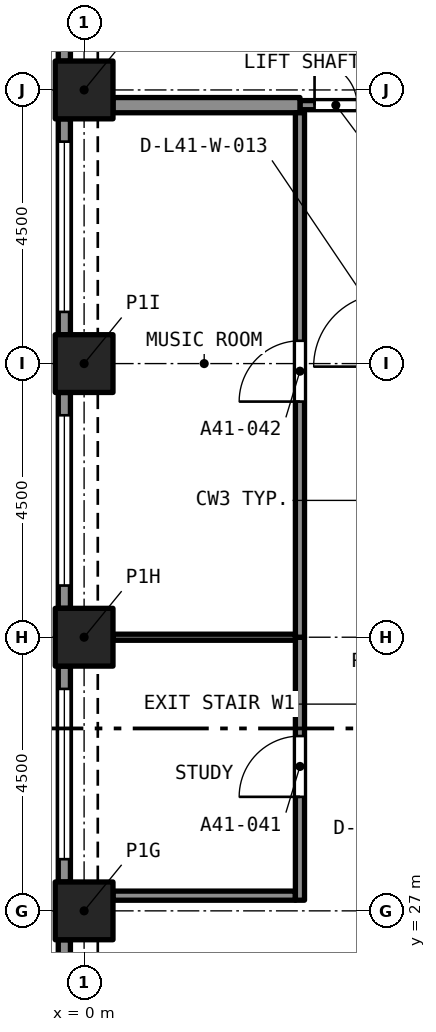
"""IFC4 building model, lengths in metres.
Left out: names, types, materials, properties, quantities, classifications, styles, units other than length and angle.
Written with IfcOpenShell. Run it as: python <this file> out.ifc"""

import sys

from ifc_helpers import new_model, si_unit, direction, frame, frame_2d, origin, origin_2d, place, context, subcontext, project, spatial, rectangle, extrude, element, fill, save


model = new_model("IFC4")
c1 = context("Model", 3, precision=1e-05, world=origin(), true_north=direction((0.0, 1.0)))
c2 = subcontext(c1, "Body", "Model", "MODEL_VIEW")
j1 = project(units=[si_unit("LENGTHUNIT", "METRE"), si_unit("PLANEANGLEUNIT", "RADIAN")], contexts=[c1])
p1 = place(None, origin())
s1 = spatial("IfcSite", under=j1, at=p1, CompositionType="ELEMENT")
p2 = place(p1, origin())
s2 = spatial("IfcBuilding", under=s1, at=p2, CompositionType="ELEMENT")
p3 = place(p2, frame((0.0, 0.0, 146.2)))
s3 = spatial("IfcBuildingStorey", under=s2, at=p3, CompositionType="ELEMENT", Elevation=146.2)
for number, where, z_axis, x_axis in (
    (1, (0.0, 27.0, 0.0), (0.0, 0.0, 1.0), (1.0, 0.0, 0.0)),
    (2, (0.0, 31.5, 0.0), (0.0, 0.0, 1.0), (1.0, 0.0, 0.0)),
    (3, (0.0, 36.0, 0.0), (0.0, 0.0, 1.0), (1.0, 0.0, 0.0)),
    (4, (0.0, 40.5, 0.0), (0.0, 0.0, 1.0), (1.0, 0.0, 0.0)),
):
    element("IfcColumn", number, at=place(p3, frame(where, z_axis=z_axis, x_axis=x_axis)), inside=s3, PredefinedType="COLUMN", context=c2, shape_type="SweptSolid", body=[
        extrude(rectangle(XDim=0.95, YDim=0.95, at=origin_2d()), origin(), (0.0, 0.0, 1.0), 4.4),
    ])
p4 = place(p3, frame((-0.325, 40.975, 0.0), z_axis=(0.0, 0.0, 1.0), x_axis=(0.0, 1.0, 0.0)))
e5 = element("IfcWall", 5, at=p4, inside=s3, PredefinedType="SOLIDWALL", context=c2, shape_type="SweptSolid", body=[
    extrude(rectangle(XDim=3.55, YDim=0.2, at=frame_2d((1.775, 0.0))), origin(), (0.0, 0.0, 1.0), 4.4),
])
p5 = place(p4, frame((0.375, 0.0, 0.45)))
e6 = element("IfcOpeningElement", 6, at=p5, cuts=e5, PredefinedType="OPENING", context=c2, shape_type="SweptSolid", body=[
    extrude(rectangle(XDim=2.8, YDim=2.55, at=frame_2d((1.4, 1.275))), frame((0.0, 0.11, 0.0), z_axis=(0.0, -1.0, 0.0), x_axis=(1.0, 0.0, 0.0)), (0.0, 0.0, 1.0), 0.22),
])
p6 = place(p3, frame((-0.325, 36.475, 0.0), z_axis=(0.0, 0.0, 1.0), x_axis=(0.0, 1.0, 0.0)))
e7 = element("IfcWall", 7, at=p6, inside=s3, PredefinedType="SOLIDWALL", context=c2, shape_type="SweptSolid", body=[
    extrude(rectangle(XDim=3.55, YDim=0.2, at=frame_2d((1.775, 0.0))), origin(), (0.0, 0.0, 1.0), 4.4),
])
p7 = place(p6, frame((0.375, 0.0, 0.45)))
e8 = element("IfcOpeningElement", 8, at=p7, cuts=e7, PredefinedType="OPENING", context=c2, shape_type="SweptSolid", body=[
    extrude(rectangle(XDim=2.8, YDim=2.55, at=frame_2d((1.4, 1.275))), frame((0.0, 0.11, 0.0), z_axis=(0.0, -1.0, 0.0), x_axis=(1.0, 0.0, 0.0)), (0.0, 0.0, 1.0), 0.22),
])
p8 = place(p3, frame((-0.325, 31.975, 0.0), z_axis=(0.0, 0.0, 1.0), x_axis=(0.0, 1.0, 0.0)))
e9 = element("IfcWall", 9, at=p8, inside=s3, PredefinedType="SOLIDWALL", context=c2, shape_type="SweptSolid", body=[
    extrude(rectangle(XDim=3.55, YDim=0.2, at=frame_2d((1.775, 0.0))), origin(), (0.0, 0.0, 1.0), 4.4),
])
p9 = place(p8, frame((0.375, 0.0, 0.45)))
e10 = element("IfcOpeningElement", 10, at=p9, cuts=e9, PredefinedType="OPENING", context=c2, shape_type="SweptSolid", body=[
    extrude(rectangle(XDim=2.8, YDim=2.55, at=frame_2d((1.4, 1.275))), frame((0.0, 0.11, 0.0), z_axis=(0.0, -1.0, 0.0), x_axis=(1.0, 0.0, 0.0)), (0.0, 0.0, 1.0), 0.22),
])
p10 = place(p3, frame((-0.325, 27.475, 0.0), z_axis=(0.0, 0.0, 1.0), x_axis=(0.0, 1.0, 0.0)))
e11 = element("IfcWall", 11, at=p10, inside=s3, PredefinedType="SOLIDWALL", context=c2, shape_type="SweptSolid", body=[
    extrude(rectangle(XDim=3.55, YDim=0.2, at=frame_2d((1.775, 0.0))), origin(), (0.0, 0.0, 1.0), 4.4),
])
p11 = place(p10, frame((0.375, 0.0, 0.45)))
e12 = element("IfcOpeningElement", 12, at=p11, cuts=e11, PredefinedType="OPENING", context=c2, shape_type="SweptSolid", body=[
    extrude(rectangle(XDim=2.8, YDim=2.55, at=frame_2d((1.4, 1.275))), frame((0.0, 0.11, 0.0), z_axis=(0.0, -1.0, 0.0), x_axis=(1.0, 0.0, 0.0)), (0.0, 0.0, 1.0), 0.22),
])
p12 = place(p3, frame((-0.325, 22.975, 0.0), z_axis=(0.0, 0.0, 1.0), x_axis=(0.0, 1.0, 0.0)))
e13 = element("IfcWall", 13, at=p12, inside=s3, PredefinedType="SOLIDWALL", context=c2, shape_type="SweptSolid", body=[
    extrude(rectangle(XDim=3.55, YDim=0.2, at=frame_2d((1.775, 0.0))), origin(), (0.0, 0.0, 1.0), 4.4),
])
p13 = place(p12, frame((0.375, 0.0, 0.45)))
e14 = element("IfcOpeningElement", 14, at=p13, cuts=e13, PredefinedType="OPENING", context=c2, shape_type="SweptSolid", body=[
    extrude(rectangle(XDim=2.8, YDim=2.55, at=frame_2d((1.4, 1.275))), frame((0.0, 0.11, 0.0), z_axis=(0.0, -1.0, 0.0), x_axis=(1.0, 0.0, 0.0)), (0.0, 0.0, 1.0), 0.22),
])
p14 = place(p3, frame((3.55, 40.25, 0.0), z_axis=(0.0, 0.0, 1.0), x_axis=(1.0, 0.0, 0.0)))
e15 = element("IfcWall", 15, at=p14, inside=s3, PredefinedType="PARTITIONING", context=c2, shape_type="SweptSolid", body=[
    extrude(rectangle(XDim=1.2, YDim=0.15, at=frame_2d((0.6, 0.0))), origin(), (0.0, 0.0, 1.0), 4.1),
])
p15 = place(p14, frame((0.24, 0.0, 0.0)))
e16 = element("IfcOpeningElement", 16, at=p15, cuts=e15, PredefinedType="OPENING", context=c2, shape_type="SweptSolid", body=[
    extrude(rectangle(XDim=0.7, YDim=2.1, at=frame_2d((0.35, 1.05))), frame((0.0, 0.085, 0.0), z_axis=(0.0, -1.0, 0.0), x_axis=(1.0, 0.0, 0.0)), (0.0, 0.0, 1.0), 0.17),
])
p16 = place(p3, frame((0.475, 40.25, 0.0), z_axis=(0.0, 0.0, 1.0), x_axis=(1.0, 0.0, 0.0)))
e17 = element("IfcWall", 17, at=p16, inside=s3, PredefinedType="PARTITIONING", context=c2, shape_type="SweptSolid", body=[
    extrude(rectangle(XDim=3.075, YDim=0.25, at=frame_2d((1.538, 0.0))), origin(), (0.0, 0.0, 1.0), 4.1),
])
p17 = place(p3, frame((0.475, 27.25, 0.0), z_axis=(0.0, 0.0, 1.0), x_axis=(1.0, 0.0, 0.0)))
e18 = element("IfcWall", 18, at=p17, inside=s3, PredefinedType="PARTITIONING", context=c2, shape_type="SweptSolid", body=[
    extrude(rectangle(XDim=3.0, YDim=0.15, at=frame_2d((1.5, 0.0))), origin(), (0.0, 0.0, 1.0), 4.1),
])
p18 = place(p3, frame((3.55, 27.175, 0.0), z_axis=(0.0, 0.0, 1.0), x_axis=(0.0, 1.0, 0.0)))
e19 = element("IfcWall", 19, at=p18, inside=s3, PredefinedType="PARTITIONING", context=c2, shape_type="SweptSolid", body=[
    extrude(rectangle(XDim=4.325, YDim=0.15, at=frame_2d((2.163, 0.0))), origin(), (0.0, 0.0, 1.0), 4.1),
])
p19 = place(p18, frame((1.7, 0.0, 0.0)))
e20 = element("IfcOpeningElement", 20, at=p19, cuts=e19, PredefinedType="OPENING", context=c2, shape_type="SweptSolid", body=[
    extrude(rectangle(XDim=1.0, YDim=2.1, at=frame_2d((0.5, 1.05))), frame((0.0, 0.085, 0.0), z_axis=(0.0, -1.0, 0.0), x_axis=(1.0, 0.0, 0.0)), (0.0, 0.0, 1.0), 0.17),
])
p20 = place(p3, frame((3.55, 31.5, 0.0), z_axis=(0.0, 0.0, 1.0), x_axis=(0.0, 1.0, 0.0)))
e21 = element("IfcWall", 21, at=p20, inside=s3, PredefinedType="PARTITIONING", context=c2, shape_type="SweptSolid", body=[
    extrude(rectangle(XDim=8.625, YDim=0.15, at=frame_2d((4.312, 0.0))), origin(), (0.0, 0.0, 1.0), 4.1),
])
p21 = place(p20, frame((3.875, 0.0, 0.0)))
e22 = element("IfcOpeningElement", 22, at=p21, cuts=e21, PredefinedType="OPENING", context=c2, shape_type="SweptSolid", body=[
    extrude(rectangle(XDim=1.0, YDim=2.1, at=frame_2d((0.5, 1.05))), frame((0.0, 0.085, 0.0), z_axis=(0.0, -1.0, 0.0), x_axis=(1.0, 0.0, 0.0)), (0.0, 0.0, 1.0), 0.17),
])
p22 = place(p3, frame((0.475, 31.5, 0.0), z_axis=(0.0, 0.0, 1.0), x_axis=(1.0, 0.0, 0.0)))
e23 = element("IfcWall", 23, at=p22, inside=s3, PredefinedType="PARTITIONING", context=c2, shape_type="SweptSolid", body=[
    extrude(rectangle(XDim=3.0, YDim=0.1, at=frame_2d((1.5, 0.0))), origin(), (0.0, 0.0, 1.0), 4.1),
])
p23 = place(p7, origin())
e24 = element("IfcWindow", 24, at=p23, inside=s3, PartitioningType="SINGLE_PANEL", PredefinedType="WINDOW", context=c2, shape_type="SweptSolid", body=[
    extrude(rectangle(XDim=2.8, YDim=2.55, at=frame_2d((1.4, 1.275))), frame((0.0, 0.03, 0.0), z_axis=(0.0, -1.0, 0.0), x_axis=(1.0, 0.0, 0.0)), (0.0, 0.0, 1.0), 0.06),
])
fill(e8, e24)
p24 = place(p9, origin())
e25 = element("IfcWindow", 25, at=p24, inside=s3, PartitioningType="SINGLE_PANEL", PredefinedType="WINDOW", context=c2, shape_type="SweptSolid", body=[
    extrude(rectangle(XDim=2.8, YDim=2.55, at=frame_2d((1.4, 1.275))), frame((0.0, 0.03, 0.0), z_axis=(0.0, -1.0, 0.0), x_axis=(1.0, 0.0, 0.0)), (0.0, 0.0, 1.0), 0.06),
])
fill(e10, e25)
p25 = place(p11, origin())
e26 = element("IfcWindow", 26, at=p25, inside=s3, PartitioningType="SINGLE_PANEL", PredefinedType="WINDOW", context=c2, shape_type="SweptSolid", body=[
    extrude(rectangle(XDim=2.8, YDim=2.55, at=frame_2d((1.4, 1.275))), frame((0.0, 0.03, 0.0), z_axis=(0.0, -1.0, 0.0), x_axis=(1.0, 0.0, 0.0)), (0.0, 0.0, 1.0), 0.06),
])
fill(e12, e26)
p26 = place(p15, origin())
e27 = element("IfcDoor", 27, at=p26, inside=s3, OperationType="SINGLE_SWING_LEFT", PredefinedType="DOOR", context=c2, shape_type="SweptSolid", body=[
    extrude(rectangle(XDim=0.7, YDim=2.1, at=frame_2d((0.35, 1.05))), frame((0.0, 0.025, 0.0), z_axis=(0.0, -1.0, 0.0), x_axis=(1.0, 0.0, 0.0)), (0.0, 0.0, 1.0), 0.05),
])
fill(e16, e27)
p27 = place(p19, origin())
e28 = element("IfcDoor", 28, at=p27, inside=s3, OperationType="SINGLE_SWING_RIGHT", PredefinedType="DOOR", context=c2, shape_type="SweptSolid", body=[
    extrude(rectangle(XDim=1.0, YDim=2.1, at=frame_2d((0.5, 1.05))), frame((0.0, 0.025, 0.0), z_axis=(0.0, -1.0, 0.0), x_axis=(1.0, 0.0, 0.0)), (0.0, 0.0, 1.0), 0.05),
])
fill(e20, e28)
p28 = place(p21, origin())
e29 = element("IfcDoor", 29, at=p28, inside=s3, OperationType="SINGLE_SWING_RIGHT", PredefinedType="DOOR", context=c2, shape_type="SweptSolid", body=[
    extrude(rectangle(XDim=1.0, YDim=2.1, at=frame_2d((0.5, 1.05))), frame((0.0, 0.025, 0.0), z_axis=(0.0, -1.0, 0.0), x_axis=(1.0, 0.0, 0.0)), (0.0, 0.0, 1.0), 0.05),
])
fill(e22, e29)
save(model, sys.argv[1])
